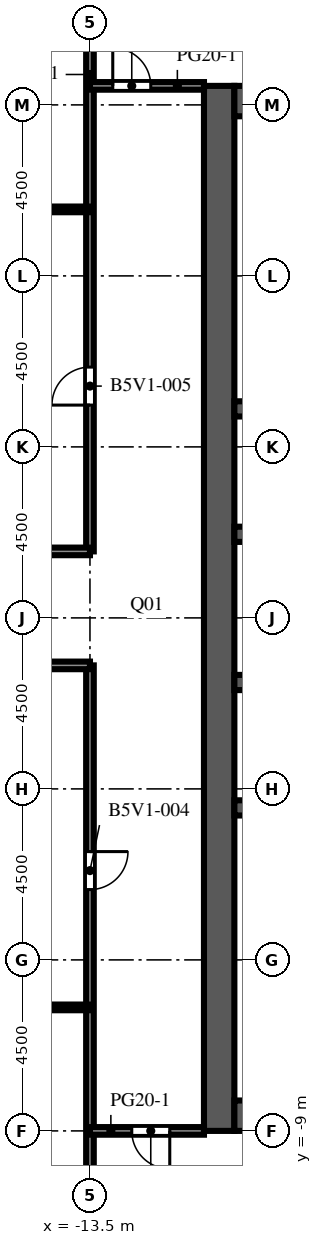
"""IFC4 building model, lengths in metres.
Left out: names, types, materials, properties, quantities, classifications, styles, units other than length and angle.
Written with IfcOpenShell. Run it as: python <this file> out.ifc"""

import sys

from ifc_helpers import new_model, si_unit, direction, frame, frame_2d, origin, place, context, subcontext, project, spatial, rectangle, extrude, element, fill, save


model = new_model("IFC4")
c1 = context("Model", 3, precision=1e-05, world=origin(), true_north=direction((0.0, 1.0)))
c2 = subcontext(c1, "Body", "Model", "MODEL_VIEW")
j1 = project(units=[si_unit("LENGTHUNIT", "METRE"), si_unit("PLANEANGLEUNIT", "RADIAN")], contexts=[c1])
p1 = place(None, origin())
s1 = spatial("IfcSite", under=j1, at=p1, CompositionType="ELEMENT")
p2 = place(p1, origin())
s2 = spatial("IfcBuilding", under=s1, at=p2, CompositionType="ELEMENT")
p3 = place(p2, frame((0.0, 0.0, 169.1)))
s3 = spatial("IfcBuildingStorey", under=s2, at=p3, CompositionType="ELEMENT", Elevation=169.1)
p4 = place(p3, frame((-10.1, -9.0, 0.0), z_axis=(0.0, 0.0, 1.0), x_axis=(0.0, 1.0, 0.0)))
e1 = element("IfcWall", 1, at=p4, inside=s3, PredefinedType="SHEAR", context=c2, shape_type="SweptSolid", body=[
    extrude(rectangle(XDim=27.5, YDim=0.8, at=frame_2d((13.75, 0.0))), origin(), (0.0, 0.0, 1.0), 4.1),
])
p5 = place(p4, frame((12.55, 0.0, 0.0)))
e2 = element("IfcOpeningElement", 2, at=p5, cuts=e1, PredefinedType="OPENING", context=c2, shape_type="SweptSolid", body=[
    extrude(rectangle(XDim=2.4, YDim=2.4, at=frame_2d((1.2, 1.2))), frame((0.0, 0.41, 0.0), z_axis=(0.0, -1.0, 0.0), x_axis=(1.0, 0.0, 0.0)), (0.0, 0.0, 1.0), 0.82),
])
p6 = place(p4, frame((6.825, 0.0, 0.0)))
e3 = element("IfcOpeningElement", 3, at=p6, cuts=e1, PredefinedType="OPENING", context=c2, shape_type="SweptSolid", body=[
    extrude(rectangle(XDim=1.2, YDim=2.1, at=frame_2d((0.6, 1.05))), frame((0.0, 0.41, 0.0), z_axis=(0.0, -1.0, 0.0), x_axis=(1.0, 0.0, 0.0)), (0.0, 0.0, 1.0), 0.82),
])
p7 = place(p4, frame((19.475, 0.0, 0.0)))
e4 = element("IfcOpeningElement", 4, at=p7, cuts=e1, PredefinedType="OPENING", context=c2, shape_type="SweptSolid", body=[
    extrude(rectangle(XDim=1.2, YDim=2.1, at=frame_2d((0.6, 1.05))), frame((0.0, 0.41, 0.0), z_axis=(0.0, -1.0, 0.0), x_axis=(1.0, 0.0, 0.0)), (0.0, 0.0, 1.0), 0.82),
])
for number, where, z_axis, x_axis in (
    (5, (-9.7, -8.6, 0.0), (0.0, 0.0, 1.0), (1.0, 0.0, 0.0)),
    (6, (-9.7, 18.1, 0.0), (0.0, 0.0, 1.0), (1.0, 0.0, 0.0)),
):
    element("IfcWall", number, at=place(p3, frame(where, z_axis=z_axis, x_axis=x_axis)), inside=s3, PredefinedType="SHEAR", context=c2, shape_type="SweptSolid", body=[
        extrude(rectangle(XDim=10.4, YDim=0.8, at=frame_2d((5.2, 0.0))), origin(), (0.0, 0.0, 1.0), 4.1),
    ])
p8 = place(p3, frame((-9.7, -0.5, 0.0), z_axis=(0.0, 0.0, 1.0), x_axis=(1.0, 0.0, 0.0)))
e7 = element("IfcWall", 7, at=p8, inside=s3, PredefinedType="SHEAR", context=c2, shape_type="SweptSolid", body=[
    extrude(rectangle(XDim=10.4, YDim=0.4, at=frame_2d((5.2, 0.0))), origin(), (0.0, 0.0, 1.0), 4.1),
])
p9 = place(p3, frame((-9.7, 2.8, 0.0), z_axis=(0.0, 0.0, 1.0), x_axis=(1.0, 0.0, 0.0)))
e8 = element("IfcWall", 8, at=p9, inside=s3, PredefinedType="SHEAR", context=c2, shape_type="SweptSolid", body=[
    extrude(rectangle(XDim=10.4, YDim=0.4, at=frame_2d((5.2, 0.0))), origin(), (0.0, 0.0, 1.0), 4.1),
])
p10 = place(p9, frame((0.738, 0.0, 0.0)))
e9 = element("IfcOpeningElement", 9, at=p10, cuts=e8, PredefinedType="OPENING", context=c2, shape_type="SweptSolid", body=[
    extrude(rectangle(XDim=1.1, YDim=2.1, at=frame_2d((0.55, 1.05))), frame((0.0, 0.21, 0.0), z_axis=(0.0, -1.0, 0.0), x_axis=(1.0, 0.0, 0.0)), (0.0, 0.0, 1.0), 0.42),
])
p11 = place(p9, frame((3.337, 0.0, 0.0)))
e10 = element("IfcOpeningElement", 10, at=p11, cuts=e8, PredefinedType="OPENING", context=c2, shape_type="SweptSolid", body=[
    extrude(rectangle(XDim=1.1, YDim=2.1, at=frame_2d((0.55, 1.05))), frame((0.0, 0.21, 0.0), z_axis=(0.0, -1.0, 0.0), x_axis=(1.0, 0.0, 0.0)), (0.0, 0.0, 1.0), 0.42),
])
p12 = place(p9, frame((6.012, 0.0, 0.0)))
e11 = element("IfcOpeningElement", 11, at=p12, cuts=e8, PredefinedType="OPENING", context=c2, shape_type="SweptSolid", body=[
    extrude(rectangle(XDim=1.0, YDim=2.1, at=frame_2d((0.5, 1.05))), frame((0.0, 0.21, 0.0), z_axis=(0.0, -1.0, 0.0), x_axis=(1.0, 0.0, 0.0)), (0.0, 0.0, 1.0), 0.42),
])
p13 = place(p9, frame((8.613, 0.0, 0.0)))
e12 = element("IfcOpeningElement", 12, at=p13, cuts=e8, PredefinedType="OPENING", context=c2, shape_type="SweptSolid", body=[
    extrude(rectangle(XDim=1.0, YDim=2.1, at=frame_2d((0.5, 1.05))), frame((0.0, 0.21, 0.0), z_axis=(0.0, -1.0, 0.0), x_axis=(1.0, 0.0, 0.0)), (0.0, 0.0, 1.0), 0.42),
])
p14 = place(p3, frame((-9.7, 6.7, 0.0), z_axis=(0.0, 0.0, 1.0), x_axis=(1.0, 0.0, 0.0)))
e13 = element("IfcWall", 13, at=p14, inside=s3, PredefinedType="SHEAR", context=c2, shape_type="SweptSolid", body=[
    extrude(rectangle(XDim=10.4, YDim=0.4, at=frame_2d((5.2, 0.0))), origin(), (0.0, 0.0, 1.0), 4.1),
])
p15 = place(p14, frame((3.337, 0.0, 0.0)))
e14 = element("IfcOpeningElement", 14, at=p15, cuts=e13, PredefinedType="OPENING", context=c2, shape_type="SweptSolid", body=[
    extrude(rectangle(XDim=1.1, YDim=2.1, at=frame_2d((0.55, 1.05))), frame((0.0, 0.21, 0.0), z_axis=(0.0, -1.0, 0.0), x_axis=(1.0, 0.0, 0.0)), (0.0, 0.0, 1.0), 0.42),
])
p16 = place(p14, frame((5.962, 0.0, 0.0)))
e15 = element("IfcOpeningElement", 15, at=p16, cuts=e13, PredefinedType="OPENING", context=c2, shape_type="SweptSolid", body=[
    extrude(rectangle(XDim=1.1, YDim=2.1, at=frame_2d((0.55, 1.05))), frame((0.0, 0.21, 0.0), z_axis=(0.0, -1.0, 0.0), x_axis=(1.0, 0.0, 0.0)), (0.0, 0.0, 1.0), 0.42),
])
p17 = place(p14, frame((8.663, 0.0, 0.0)))
e16 = element("IfcOpeningElement", 16, at=p17, cuts=e13, PredefinedType="OPENING", context=c2, shape_type="SweptSolid", body=[
    extrude(rectangle(XDim=1.1, YDim=2.1, at=frame_2d((0.55, 1.05))), frame((0.0, 0.21, 0.0), z_axis=(0.0, -1.0, 0.0), x_axis=(1.0, 0.0, 0.0)), (0.0, 0.0, 1.0), 0.42),
])
p18 = place(p14, frame((0.688, 0.0, 0.0)))
e17 = element("IfcOpeningElement", 17, at=p18, cuts=e13, PredefinedType="OPENING", context=c2, shape_type="SweptSolid", body=[
    extrude(rectangle(XDim=1.0, YDim=2.1, at=frame_2d((0.5, 1.05))), frame((0.0, 0.21, 0.0), z_axis=(0.0, -1.0, 0.0), x_axis=(1.0, 0.0, 0.0)), (0.0, 0.0, 1.0), 0.42),
])
p19 = place(p3, frame((-9.7, 10.0, 0.0), z_axis=(0.0, 0.0, 1.0), x_axis=(1.0, 0.0, 0.0)))
e18 = element("IfcWall", 18, at=p19, inside=s3, PredefinedType="SHEAR", context=c2, shape_type="SweptSolid", body=[
    extrude(rectangle(XDim=10.4, YDim=0.4, at=frame_2d((5.2, 0.0))), origin(), (0.0, 0.0, 1.0), 4.1),
])
p20 = place(p3, frame((-13.5, -26.5, 0.0), z_axis=(0.0, 0.0, 1.0), x_axis=(0.0, 1.0, 0.0)))
e19 = element("IfcWall", 19, at=p20, inside=s3, PredefinedType="PARTITIONING", context=c2, shape_type="SweptSolid", body=[
    extrude(rectangle(XDim=29.75, YDim=0.2, at=frame_2d((14.875, 0.0))), origin(), (0.0, 0.0, 1.0), 3.65),
])
p21 = place(p20, frame((23.85, 0.0, 0.0)))
e20 = element("IfcOpeningElement", 20, at=p21, cuts=e19, PredefinedType="OPENING", context=c2, shape_type="SweptSolid", body=[
    extrude(rectangle(XDim=1.0, YDim=2.1, at=frame_2d((0.5, 1.05))), frame((0.0, 0.11, 0.0), z_axis=(0.0, -1.0, 0.0), x_axis=(1.0, 0.0, 0.0)), (0.0, 0.0, 1.0), 0.22),
])
p22 = place(p3, frame((-13.5, 6.25, 0.0), z_axis=(0.0, 0.0, 1.0), x_axis=(0.0, 1.0, 0.0)))
e21 = element("IfcWall", 21, at=p22, inside=s3, PredefinedType="PARTITIONING", context=c2, shape_type="SweptSolid", body=[
    extrude(rectangle(XDim=20.25, YDim=0.2, at=frame_2d((10.125, 0.0))), origin(), (0.0, 0.0, 1.0), 3.65),
])
p23 = place(p22, frame((3.85, 0.0, 0.0)))
e22 = element("IfcOpeningElement", 22, at=p23, cuts=e21, PredefinedType="OPENING", context=c2, shape_type="SweptSolid", body=[
    extrude(rectangle(XDim=1.0, YDim=2.1, at=frame_2d((0.5, 1.05))), frame((0.0, 0.11, 0.0), z_axis=(0.0, -1.0, 0.0), x_axis=(1.0, 0.0, 0.0)), (0.0, 0.0, 1.0), 0.22),
])
p24 = place(p3, frame((-10.5, -9.0, 0.0), z_axis=(0.0, 0.0, 1.0), x_axis=(-1.0, 0.0, 0.0)))
e23 = element("IfcWall", 23, at=p24, inside=s3, PredefinedType="PARTITIONING", context=c2, shape_type="SweptSolid", body=[
    extrude(rectangle(XDim=3.0, YDim=0.2, at=frame_2d((1.5, 0.0))), origin(), (0.0, 0.0, 1.0), 3.65),
])
p25 = place(p24, frame((0.9, 0.0, 0.0)))
e24 = element("IfcOpeningElement", 24, at=p25, cuts=e23, PredefinedType="OPENING", context=c2, shape_type="SweptSolid", body=[
    extrude(rectangle(XDim=1.0, YDim=2.1, at=frame_2d((0.5, 1.05))), frame((0.0, 0.11, 0.0), z_axis=(0.0, -1.0, 0.0), x_axis=(1.0, 0.0, 0.0)), (0.0, 0.0, 1.0), 0.22),
])
p26 = place(p3, frame((-13.5, -5.75, 0.0), z_axis=(0.0, 0.0, 1.0), x_axis=(-1.0, 0.0, 0.0)))
e25 = element("IfcWall", 25, at=p26, inside=s3, PredefinedType="PARTITIONING", context=c2, shape_type="SweptSolid", body=[
    extrude(rectangle(XDim=13.35, YDim=0.15, at=frame_2d((6.675, 0.0))), origin(), (0.0, 0.0, 1.0), 3.65),
])
p27 = place(p26, frame((8.9, 0.0, 0.0)))
e26 = element("IfcOpeningElement", 26, at=p27, cuts=e25, PredefinedType="OPENING", context=c2, shape_type="SweptSolid", body=[
    extrude(rectangle(XDim=1.0, YDim=2.1, at=frame_2d((0.5, 1.05))), frame((0.0, 0.085, 0.0), z_axis=(0.0, -1.0, 0.0), x_axis=(1.0, 0.0, 0.0)), (0.0, 0.0, 1.0), 0.17),
])
p28 = place(p26, frame((1.65, 0.0, 0.0)))
e27 = element("IfcOpeningElement", 27, at=p28, cuts=e25, PredefinedType="OPENING", context=c2, shape_type="SweptSolid", body=[
    extrude(rectangle(XDim=1.0, YDim=2.1, at=frame_2d((0.5, 1.05))), frame((0.0, 0.085, 0.0), z_axis=(0.0, -1.0, 0.0), x_axis=(1.0, 0.0, 0.0)), (0.0, 0.0, 1.0), 0.17),
])
p29 = place(p3, frame((-13.5, 3.25, 0.0), z_axis=(0.0, 0.0, 1.0), x_axis=(-1.0, 0.0, 0.0)))
e28 = element("IfcWall", 28, at=p29, inside=s3, PredefinedType="PARTITIONING", context=c2, shape_type="SweptSolid", body=[
    extrude(rectangle(XDim=13.35, YDim=0.2, at=frame_2d((6.675, 0.0))), origin(), (0.0, 0.0, 1.0), 3.65),
])
p30 = place(p29, frame((8.15, 0.0, 0.0)))
e29 = element("IfcOpeningElement", 29, at=p30, cuts=e28, PredefinedType="OPENING", context=c2, shape_type="SweptSolid", body=[
    extrude(rectangle(XDim=1.0, YDim=2.1, at=frame_2d((0.5, 1.05))), frame((0.0, 0.11, 0.0), z_axis=(0.0, -1.0, 0.0), x_axis=(1.0, 0.0, 0.0)), (0.0, 0.0, 1.0), 0.22),
])
p31 = place(p3, frame((-26.85, 6.25, 0.0), z_axis=(0.0, 0.0, 1.0), x_axis=(1.0, 0.0, 0.0)))
e30 = element("IfcWall", 30, at=p31, inside=s3, PredefinedType="PARTITIONING", context=c2, shape_type="SweptSolid", body=[
    extrude(rectangle(XDim=13.35, YDim=0.2, at=frame_2d((6.675, 0.0))), origin(), (0.0, 0.0, 1.0), 3.65),
])
p32 = place(p31, frame((2.45, 0.0, 0.0)))
e31 = element("IfcOpeningElement", 31, at=p32, cuts=e30, PredefinedType="OPENING", context=c2, shape_type="SweptSolid", body=[
    extrude(rectangle(XDim=1.0, YDim=2.1, at=frame_2d((0.5, 1.05))), frame((0.0, 0.11, 0.0), z_axis=(0.0, -1.0, 0.0), x_axis=(1.0, 0.0, 0.0)), (0.0, 0.0, 1.0), 0.22),
])
p33 = place(p3, frame((-26.85, 15.25, 0.0), z_axis=(0.0, 0.0, 1.0), x_axis=(1.0, 0.0, 0.0)))
e32 = element("IfcWall", 32, at=p33, inside=s3, PredefinedType="PARTITIONING", context=c2, shape_type="SweptSolid", body=[
    extrude(rectangle(XDim=13.35, YDim=0.15, at=frame_2d((6.675, 0.0))), origin(), (0.0, 0.0, 1.0), 3.65),
])
p34 = place(p33, frame((2.95, 0.0, 0.0)))
e33 = element("IfcOpeningElement", 33, at=p34, cuts=e32, PredefinedType="OPENING", context=c2, shape_type="SweptSolid", body=[
    extrude(rectangle(XDim=1.0, YDim=2.1, at=frame_2d((0.5, 1.05))), frame((0.0, 0.085, 0.0), z_axis=(0.0, -1.0, 0.0), x_axis=(1.0, 0.0, 0.0)), (0.0, 0.0, 1.0), 0.17),
])
p35 = place(p33, frame((10.2, 0.0, 0.0)))
e34 = element("IfcOpeningElement", 34, at=p35, cuts=e32, PredefinedType="OPENING", context=c2, shape_type="SweptSolid", body=[
    extrude(rectangle(XDim=1.0, YDim=2.1, at=frame_2d((0.5, 1.05))), frame((0.0, 0.085, 0.0), z_axis=(0.0, -1.0, 0.0), x_axis=(1.0, 0.0, 0.0)), (0.0, 0.0, 1.0), 0.17),
])
p36 = place(p3, frame((-13.5, 18.5, 0.0), z_axis=(0.0, 0.0, 1.0), x_axis=(1.0, 0.0, 0.0)))
e35 = element("IfcWall", 35, at=p36, inside=s3, PredefinedType="PARTITIONING", context=c2, shape_type="SweptSolid", body=[
    extrude(rectangle(XDim=3.0, YDim=0.2, at=frame_2d((1.5, 0.0))), origin(), (0.0, 0.0, 1.0), 3.65),
])
p37 = place(p36, frame((0.6, 0.0, 0.0)))
e36 = element("IfcOpeningElement", 36, at=p37, cuts=e35, PredefinedType="OPENING", context=c2, shape_type="SweptSolid", body=[
    extrude(rectangle(XDim=1.0, YDim=2.1, at=frame_2d((0.5, 1.05))), frame((0.0, 0.11, 0.0), z_axis=(0.0, -1.0, 0.0), x_axis=(1.0, 0.0, 0.0)), (0.0, 0.0, 1.0), 0.22),
])
p38 = place(p5, origin())
e37 = element("IfcDoor", 37, at=p38, inside=s3, OperationType="DOUBLE_DOOR_DOUBLE_SWING", PredefinedType="DOOR", context=c2, shape_type="SweptSolid", body=[
    extrude(rectangle(XDim=2.4, YDim=2.4, at=frame_2d((1.2, 1.2))), frame((0.0, 0.025, 0.0), z_axis=(0.0, -1.0, 0.0), x_axis=(1.0, 0.0, 0.0)), (0.0, 0.0, 1.0), 0.05),
])
fill(e2, e37)
p39 = place(p6, origin())
e38 = element("IfcDoor", 38, at=p39, inside=s3, OperationType="SINGLE_SWING_LEFT", PredefinedType="DOOR", context=c2, shape_type="SweptSolid", body=[
    extrude(rectangle(XDim=1.2, YDim=2.1, at=frame_2d((0.6, 1.05))), frame((0.0, 0.025, 0.0), z_axis=(0.0, -1.0, 0.0), x_axis=(1.0, 0.0, 0.0)), (0.0, 0.0, 1.0), 0.05),
])
fill(e3, e38)
p40 = place(p7, origin())
e39 = element("IfcDoor", 39, at=p40, inside=s3, OperationType="SINGLE_SWING_LEFT", PredefinedType="DOOR", context=c2, shape_type="SweptSolid", body=[
    extrude(rectangle(XDim=1.2, YDim=2.1, at=frame_2d((0.6, 1.05))), frame((0.0, 0.025, 0.0), z_axis=(0.0, -1.0, 0.0), x_axis=(1.0, 0.0, 0.0)), (0.0, 0.0, 1.0), 0.05),
])
fill(e4, e39)
p41 = place(p21, origin())
e40 = element("IfcDoor", 40, at=p41, inside=s3, OperationType="SINGLE_SWING_RIGHT", PredefinedType="DOOR", context=c2, shape_type="SweptSolid", body=[
    extrude(rectangle(XDim=1.0, YDim=2.1, at=frame_2d((0.5, 1.05))), frame((0.0, 0.025, 0.0), z_axis=(0.0, -1.0, 0.0), x_axis=(1.0, 0.0, 0.0)), (0.0, 0.0, 1.0), 0.05),
])
fill(e20, e40)
p42 = place(p23, origin())
e41 = element("IfcDoor", 41, at=p42, inside=s3, OperationType="SINGLE_SWING_LEFT", PredefinedType="DOOR", context=c2, shape_type="SweptSolid", body=[
    extrude(rectangle(XDim=1.0, YDim=2.1, at=frame_2d((0.5, 1.05))), frame((0.0, 0.025, 0.0), z_axis=(0.0, -1.0, 0.0), x_axis=(1.0, 0.0, 0.0)), (0.0, 0.0, 1.0), 0.05),
])
fill(e22, e41)
p43 = place(p25, origin())
e42 = element("IfcDoor", 42, at=p43, inside=s3, OperationType="SINGLE_SWING_LEFT", PredefinedType="DOOR", context=c2, shape_type="SweptSolid", body=[
    extrude(rectangle(XDim=1.0, YDim=2.1, at=frame_2d((0.5, 1.05))), frame((0.0, 0.025, 0.0), z_axis=(0.0, -1.0, 0.0), x_axis=(1.0, 0.0, 0.0)), (0.0, 0.0, 1.0), 0.05),
])
fill(e24, e42)
p44 = place(p37, origin())
e43 = element("IfcDoor", 43, at=p44, inside=s3, OperationType="SINGLE_SWING_LEFT", PredefinedType="DOOR", context=c2, shape_type="SweptSolid", body=[
    extrude(rectangle(XDim=1.0, YDim=2.1, at=frame_2d((0.5, 1.05))), frame((0.0, 0.025, 0.0), z_axis=(0.0, -1.0, 0.0), x_axis=(1.0, 0.0, 0.0)), (0.0, 0.0, 1.0), 0.05),
])
fill(e36, e43)
save(model, sys.argv[1])
